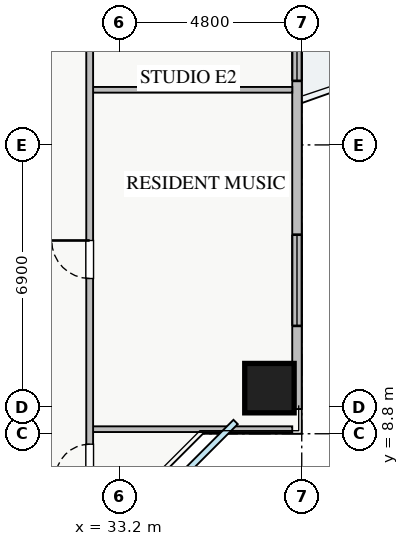
"""IFC4 building model, lengths in metres.
Left out: names, types, materials, properties, quantities, classifications, styles, units other than length and angle.
Written with IfcOpenShell. Run it as: python <this file> out.ifc"""

import sys

from ifc_helpers import new_model, si_unit, direction, frame, frame_2d, origin, origin_2d, place, context, subcontext, project, spatial, rectangle, extrude, source, transform, mapped, element, fill, save


model = new_model("IFC4")
c1 = context("Model", 3, precision=1e-05, world=origin(), true_north=direction((0.0, 1.0)))
c2 = subcontext(c1, "Body", "Model", "MODEL_VIEW")
j1 = project(units=[si_unit("LENGTHUNIT", "METRE"), si_unit("PLANEANGLEUNIT", "RADIAN")], contexts=[c1])
p1 = place(None, origin())
s1 = spatial("IfcSite", under=j1, at=p1, CompositionType="ELEMENT")
p2 = place(p1, origin())
s2 = spatial("IfcBuilding", under=s1, at=p2, CompositionType="ELEMENT")
p3 = place(p2, frame((0.0, 0.0, 82.75)))
s3 = spatial("IfcBuildingStorey", under=s2, at=p3, CompositionType="ELEMENT", Elevation=82.75)
m1 = source(origin(), c2, "Body", "SweptSolid", [
    extrude(rectangle(XDim=1.3, YDim=1.3, at=origin_2d()), origin(), (0.0, 0.0, 1.0), 3.25),
])
p4 = place(p3, frame((37.15, 10.0, 0.0), z_axis=(0.0, 0.0, 1.0), x_axis=(1.0, 0.0, 0.0)))
e1 = element("IfcColumn", 1, at=p4, inside=s3, PredefinedType="COLUMN", context=c2, shape_type="MappedRepresentation", body=[
    mapped(m1, transform((0.0, 0.0, 0.0), x_axis=(1.0, 0.0, 0.0), y_axis=(0.0, 1.0, 0.0), z_axis=(0.0, 0.0, 1.0), scale=1.0)),
])
p5 = place(p3, frame((37.875, 9.45, 0.0), z_axis=(0.0, 0.0, 1.0), x_axis=(0.0, 1.0, 0.0)))
e2 = element("IfcWall", 2, at=p5, inside=s3, PredefinedType="STANDARD", context=c2, shape_type="SweptSolid", body=[
    extrude(rectangle(XDim=27.1, YDim=0.25, at=frame_2d((13.55, 0.0))), origin(), (0.0, 0.0, 1.0), 2.61),
])
p6 = place(p5, frame((14.4, 0.0, 0.0)))
e3 = element("IfcOpeningElement", 3, at=p6, cuts=e2, PredefinedType="OPENING", context=c2, shape_type="SweptSolid", body=[
    extrude(rectangle(XDim=1.2, YDim=2.1, at=frame_2d((0.6, 1.05))), frame((0.0, 0.135, 0.0), z_axis=(0.0, -1.0, 0.0), x_axis=(1.0, 0.0, 0.0)), (0.0, 0.0, 1.0), 0.27),
])
p7 = place(p5, frame((2.188, 0.0, 0.9)))
e4 = element("IfcOpeningElement", 4, at=p7, cuts=e2, PredefinedType="OPENING", context=c2, shape_type="SweptSolid", body=[
    extrude(rectangle(XDim=2.4, YDim=1.48, at=frame_2d((1.2, 0.74))), frame((0.0, 0.135, 0.0), z_axis=(0.0, -1.0, 0.0), x_axis=(1.0, 0.0, 0.0)), (0.0, 0.0, 1.0), 0.27),
])
p8 = place(p5, frame((23.788, 0.0, 0.9)))
e5 = element("IfcOpeningElement", 5, at=p8, cuts=e2, PredefinedType="OPENING", context=c2, shape_type="SweptSolid", body=[
    extrude(rectangle(XDim=1.8, YDim=1.5, at=frame_2d((0.9, 0.75))), frame((0.0, 0.135, 0.0), z_axis=(0.0, -1.0, 0.0), x_axis=(1.0, 0.0, 0.0)), (0.0, 0.0, 1.0), 0.27),
])
p9 = place(p5, frame((19.758, 0.0, 0.9)))
e6 = element("IfcOpeningElement", 6, at=p9, cuts=e2, PredefinedType="OPENING", context=c2, shape_type="SweptSolid", body=[
    extrude(rectangle(XDim=2.4, YDim=1.5, at=frame_2d((1.2, 0.75))), frame((0.0, 0.135, 0.0), z_axis=(0.0, -1.0, 0.0), x_axis=(1.0, 0.0, 0.0)), (0.0, 0.0, 1.0), 0.27),
])
p10 = place(p5, frame((8.635, 0.0, 0.9)))
e7 = element("IfcOpeningElement", 7, at=p10, cuts=e2, PredefinedType="OPENING", context=c2, shape_type="SweptSolid", body=[
    extrude(rectangle(XDim=0.9, YDim=1.2, at=frame_2d((0.45, 0.6))), frame((0.0, 0.135, 0.0), z_axis=(0.0, -1.0, 0.0), x_axis=(1.0, 0.0, 0.0)), (0.0, 0.0, 1.0), 0.27),
])
for number, where, z_axis, x_axis in (
    (8, (32.42, 8.92, 0.0), (0.0, 0.0, 1.0), (1.0, 0.0, 0.0)),
    (9, (32.42, 17.85, 0.0), (0.0, 0.0, 1.0), (1.0, 0.0, 0.0)),
):
    element("IfcWall", number, at=place(p3, frame(where, z_axis=z_axis, x_axis=x_axis)), inside=s3, PredefinedType="PARTITIONING", context=c2, shape_type="SweptSolid", body=[
        extrude(rectangle(XDim=5.33, YDim=0.15, at=frame_2d((2.665, 0.0))), origin(), (0.0, 0.0, 1.0), 3.07),
    ])
p11 = place(p3, frame((32.42, 7.21, 0.0), z_axis=(0.0, 0.0, 1.0), x_axis=(0.0, 1.0, 0.0)))
e10 = element("IfcWall", 10, at=p11, inside=s3, PredefinedType="PARTITIONING", context=c2, shape_type="SweptSolid", body=[
    extrude(rectangle(XDim=31.23, YDim=0.18, at=frame_2d((15.615, 0.0))), origin(), (0.0, 0.0, 1.0), 2.865),
])
p12 = place(p11, frame((30.09, 0.0, 0.0)))
e11 = element("IfcOpeningElement", 11, at=p12, cuts=e10, PredefinedType="OPENING", context=c2, shape_type="SweptSolid", body=[
    extrude(rectangle(XDim=0.9, YDim=2.05, at=frame_2d((0.45, 1.025))), frame((0.0, 0.1, 0.0), z_axis=(0.0, -1.0, 0.0), x_axis=(1.0, 0.0, 0.0)), (0.0, 0.0, 1.0), 0.2),
])
p13 = place(p11, frame((0.415, 0.0, 0.0)))
e12 = element("IfcOpeningElement", 12, at=p13, cuts=e10, PredefinedType="OPENING", context=c2, shape_type="SweptSolid", body=[
    extrude(rectangle(XDim=0.9, YDim=2.05, at=frame_2d((0.45, 1.025))), frame((0.0, 0.1, 0.0), z_axis=(0.0, -1.0, 0.0), x_axis=(1.0, 0.0, 0.0)), (0.0, 0.0, 1.0), 0.2),
])
p14 = place(p11, frame((5.675, 0.0, 0.0)))
e13 = element("IfcOpeningElement", 13, at=p14, cuts=e10, PredefinedType="OPENING", context=c2, shape_type="SweptSolid", body=[
    extrude(rectangle(XDim=1.0, YDim=2.05, at=frame_2d((0.5, 1.025))), frame((0.0, 0.1, 0.0), z_axis=(0.0, -1.0, 0.0), x_axis=(1.0, 0.0, 0.0)), (0.0, 0.0, 1.0), 0.2),
])
p15 = place(p11, frame((12.575, 0.0, 0.0)))
e14 = element("IfcOpeningElement", 14, at=p15, cuts=e10, PredefinedType="OPENING", context=c2, shape_type="SweptSolid", body=[
    extrude(rectangle(XDim=1.0, YDim=2.05, at=frame_2d((0.5, 1.025))), frame((0.0, 0.1, 0.0), z_axis=(0.0, -1.0, 0.0), x_axis=(1.0, 0.0, 0.0)), (0.0, 0.0, 1.0), 0.2),
])
p16 = place(p11, frame((22.5, 0.0, 0.0)))
e15 = element("IfcOpeningElement", 15, at=p16, cuts=e10, PredefinedType="OPENING", context=c2, shape_type="SweptSolid", body=[
    extrude(rectangle(XDim=1.0, YDim=2.05, at=frame_2d((0.5, 1.025))), frame((0.0, 0.1, 0.0), z_axis=(0.0, -1.0, 0.0), x_axis=(1.0, 0.0, 0.0)), (0.0, 0.0, 1.0), 0.2),
])
m2 = source(origin(), c2, "Body", "SweptSolid", [
    extrude(rectangle(XDim=2.4, YDim=1.48, at=frame_2d((1.2, 0.74))), frame((0.0, 0.03, 0.0), z_axis=(0.0, -1.0, 0.0), x_axis=(1.0, 0.0, 0.0)), (0.0, 0.0, 1.0), 0.06),
])
p17 = place(p7, origin())
e16 = element("IfcWindow", 16, at=p17, inside=s3, PartitioningType="TRIPLE_PANEL_VERTICAL", PredefinedType="WINDOW", context=c2, shape_type="MappedRepresentation", body=[
    mapped(m2, transform((0.0, 0.0, 0.0), x_axis=(1.0, 0.0, 0.0), y_axis=(0.0, 1.0, 0.0), z_axis=(0.0, 0.0, 1.0), scale=1.0)),
])
fill(e4, e16)
m3 = source(origin(), c2, "Body", "SweptSolid", [
    extrude(rectangle(XDim=0.9, YDim=2.05, at=frame_2d((0.45, 1.025))), frame((0.0, 0.025, 0.0), z_axis=(0.0, -1.0, 0.0), x_axis=(1.0, 0.0, 0.0)), (0.0, 0.0, 1.0), 0.05),
])
p18 = place(p13, origin())
e17 = element("IfcDoor", 17, at=p18, inside=s3, OperationType="SINGLE_SWING_LEFT", PredefinedType="DOOR", context=c2, shape_type="MappedRepresentation", body=[
    mapped(m3, transform((0.0, 0.0, 0.0), x_axis=(1.0, 0.0, 0.0), y_axis=(0.0, 1.0, 0.0), z_axis=(0.0, 0.0, 1.0), scale=1.0)),
])
fill(e12, e17)
m4 = source(origin(), c2, "Body", "SweptSolid", [
    extrude(rectangle(XDim=1.0, YDim=2.05, at=frame_2d((0.5, 1.025))), frame((0.0, 0.025, 0.0), z_axis=(0.0, -1.0, 0.0), x_axis=(1.0, 0.0, 0.0)), (0.0, 0.0, 1.0), 0.05),
])
p19 = place(p14, origin())
e18 = element("IfcDoor", 18, at=p19, inside=s3, OperationType="SINGLE_SWING_RIGHT", PredefinedType="DOOR", context=c2, shape_type="MappedRepresentation", body=[
    mapped(m4, transform((0.0, 0.0, 0.0), x_axis=(1.0, 0.0, 0.0), y_axis=(0.0, 1.0, 0.0), z_axis=(0.0, 0.0, 1.0), scale=1.0)),
])
fill(e13, e18)
m5 = source(origin(), c2, "Body", "SweptSolid", [
    extrude(rectangle(XDim=0.9, YDim=1.2, at=frame_2d((0.45, 0.6))), frame((0.0, 0.03, 0.0), z_axis=(0.0, -1.0, 0.0), x_axis=(1.0, 0.0, 0.0)), (0.0, 0.0, 1.0), 0.06),
])
p20 = place(p10, origin())
e19 = element("IfcWindow", 19, at=p20, inside=s3, PartitioningType="SINGLE_PANEL", PredefinedType="WINDOW", context=c2, shape_type="MappedRepresentation", body=[
    mapped(m5, transform((0.0, 0.0, 0.0), x_axis=(1.0, 0.0, 0.0), y_axis=(0.0, 1.0, 0.0), z_axis=(0.0, 0.0, 1.0), scale=1.0)),
])
fill(e7, e19)
save(model, sys.argv[1])
